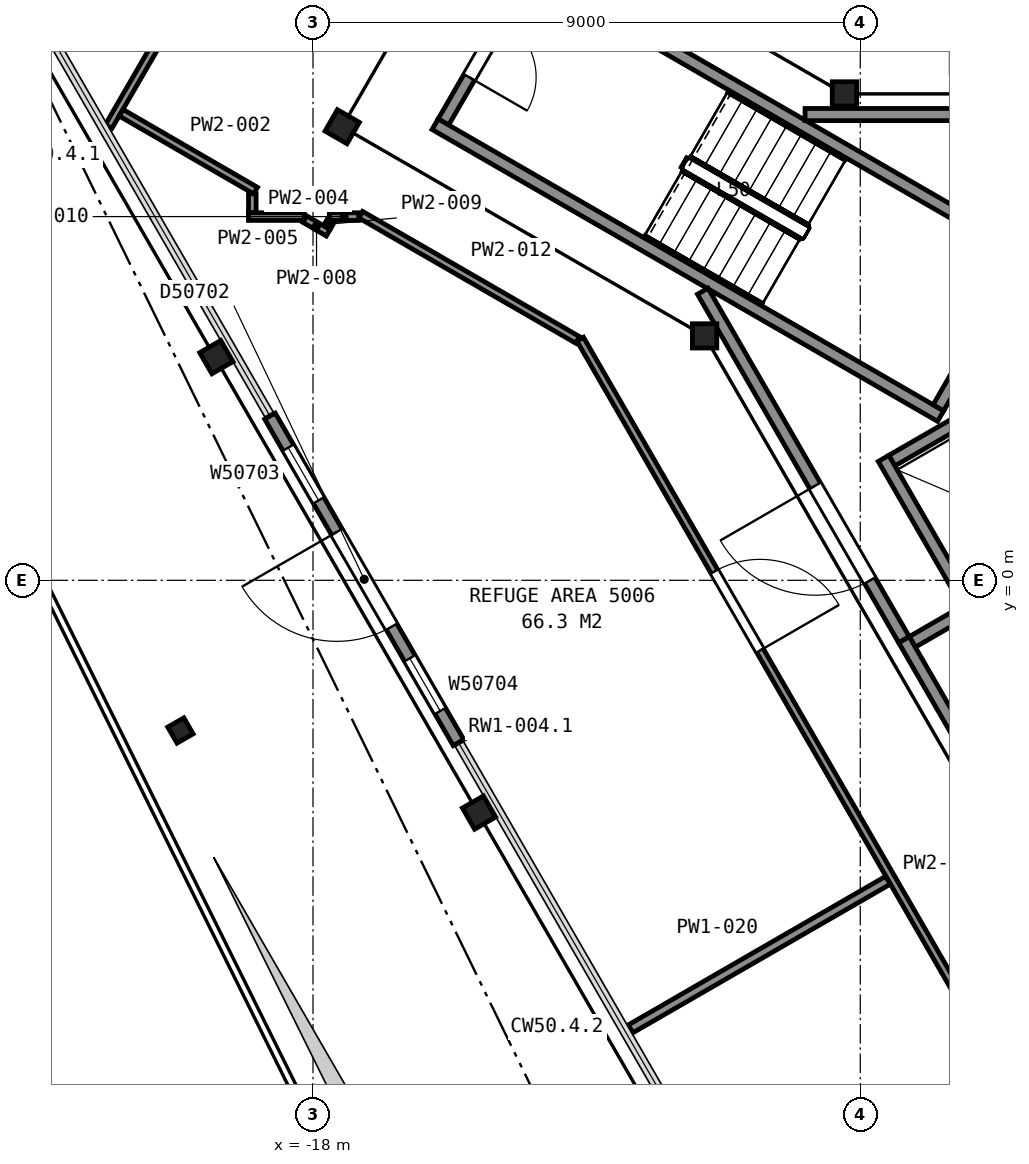
"""IFC4 building model, lengths in metres.
Left out: names, types, materials, properties, quantities, classifications, styles, units other than length and angle.
Written with IfcOpenShell. Run it as: python <this file> out.ifc"""

import sys

from ifc_helpers import new_model, si_unit, direction, frame, frame_2d, origin, origin_2d, place, context, subcontext, project, spatial, rectangle, hollow_rectangle, i_section, extrude, element, fill, save


model = new_model("IFC4")
c1 = context("Model", 3, precision=1e-05, world=origin(), true_north=direction((0.0, 1.0)))
c2 = subcontext(c1, "Body", "Model", "MODEL_VIEW")
j1 = project(units=[si_unit("LENGTHUNIT", "METRE"), si_unit("PLANEANGLEUNIT", "RADIAN")], contexts=[c1])
p1 = place(None, origin())
s1 = spatial("IfcSite", under=j1, at=p1, CompositionType="ELEMENT")
p2 = place(p1, origin())
s2 = spatial("IfcBuilding", under=s1, at=p2, CompositionType="ELEMENT")
p3 = place(p2, frame((0.0, 0.0, 200.6)))
s3 = spatial("IfcBuildingStorey", under=s2, at=p3, CompositionType="ELEMENT", Elevation=200.6)
for number, where, z_axis, x_axis in (
    (1, (-19.59, 3.67, -0.16), (0.0, 0.0, 1.0), (-0.5, 0.866, 0.0)),
    (2, (-15.27, -3.82, -0.16), (0.0, 0.0, 1.0), (-0.5, 0.866, 0.0)),
):
    element("IfcColumn", number, at=place(p3, frame(where, z_axis=z_axis, x_axis=x_axis)), inside=s3, PredefinedType="COLUMN", context=c2, shape_type="SweptSolid", body=[
        extrude(i_section(OverallWidth=0.401, OverallDepth=0.399, WebThickness=0.025, FlangeThickness=0.04, FilletRadius=0.015, at=origin_2d()), origin(), (0.0, 0.0, 1.0), 5.96),
    ])
p4 = place(p3, frame((-9.26, 8.0, 0.0), z_axis=(0.0, 0.0, 1.0), x_axis=(1.0, 0.0, 0.0)))
e3 = element("IfcColumn", 3, at=p4, inside=s3, PredefinedType="COLUMN", context=c2, shape_type="SweptSolid", body=[
    extrude(i_section(OverallWidth=0.401, OverallDepth=0.399, WebThickness=0.025, FlangeThickness=0.04, FilletRadius=0.015, at=origin_2d()), origin(), (0.0, 0.0, 1.0), 5.8),
])
p5 = place(p3, frame((-17.52, 7.46, 0.0), z_axis=(0.0, 0.0, 1.0), x_axis=(0.5, 0.866025403784, 0.0)))
e4 = element("IfcColumn", 4, at=p5, inside=s3, PredefinedType="COLUMN", context=c2, shape_type="SweptSolid", body=[
    extrude(i_section(OverallWidth=0.406, OverallDepth=0.417, WebThickness=0.03, FlangeThickness=0.048, FilletRadius=0.015, at=origin_2d()), origin(), (0.0, 0.0, 1.0), 5.8),
])
p6 = place(p3, frame((-11.56, 4.02, 0.0), z_axis=(0.0, 0.0, 1.0), x_axis=(1.0, 0.0, 0.0)))
e5 = element("IfcColumn", 5, at=p6, inside=s3, PredefinedType="COLUMN", context=c2, shape_type="SweptSolid", body=[
    extrude(i_section(OverallWidth=0.401, OverallDepth=0.399, WebThickness=0.025, FlangeThickness=0.04, FilletRadius=0.015, at=origin_2d()), origin(), (0.0, 0.0, 1.0), 5.8),
])
p7 = place(p3, frame((-20.18, -2.47, -0.69), z_axis=(0.0, 0.0, 1.0), x_axis=(-0.5, 0.866025403784, 0.0)))
e6 = element("IfcColumn", 6, at=p7, inside=s3, PredefinedType="COLUMN", context=c2, shape_type="SweptSolid", body=[
    extrude(hollow_rectangle(XDim=0.305, YDim=0.305, WallThickness=0.013, InnerFilletRadius=0.006, OuterFilletRadius=0.019, at=origin_2d()), origin(), (0.0, 0.0, 1.0), 5.4),
])
p8 = place(p3, frame((-18.708, 2.701, 0.0), z_axis=(0.0, 0.0, 1.0), x_axis=(0.500009909098, -0.866019682689, 0.0)))
e7 = element("IfcWall", 7, at=p8, inside=s3, PredefinedType="SOLIDWALL", context=c2, shape_type="SweptSolid", body=[
    extrude(rectangle(XDim=6.2, YDim=0.2, at=frame_2d((3.1, 0.0))), origin(), (0.0, 0.0, 1.0), 4.522),
])
p9 = place(p8, frame((0.6, 0.0, 0.9)))
e8 = element("IfcOpeningElement", 8, at=p9, cuts=e7, PredefinedType="OPENING", context=c2, shape_type="SweptSolid", body=[
    extrude(rectangle(XDim=1.0, YDim=1.5, at=frame_2d((0.5, 0.75))), frame((0.0, 0.11, 0.0), z_axis=(0.0, -1.0, 0.0), x_axis=(1.0, 0.0, 0.0)), (0.0, 0.0, 1.0), 0.22),
])
p10 = place(p8, frame((2.2, 0.0, 0.0)))
e9 = element("IfcOpeningElement", 9, at=p10, cuts=e7, PredefinedType="OPENING", context=c2, shape_type="SweptSolid", body=[
    extrude(rectangle(XDim=1.8, YDim=2.4, at=frame_2d((0.9, 1.2))), frame((0.0, 0.11, 0.0), z_axis=(0.0, -1.0, 0.0), x_axis=(1.0, 0.0, 0.0)), (0.0, 0.0, 1.0), 0.22),
])
p11 = place(p8, frame((4.6, 0.0, 0.9)))
e10 = element("IfcOpeningElement", 10, at=p11, cuts=e7, PredefinedType="OPENING", context=c2, shape_type="SweptSolid", body=[
    extrude(rectangle(XDim=1.0, YDim=1.5, at=frame_2d((0.5, 0.75))), frame((0.0, 0.11, 0.0), z_axis=(0.0, -1.0, 0.0), x_axis=(1.0, 0.0, 0.0)), (0.0, 0.0, 1.0), 0.22),
])
p12 = place(p3, frame((-14.455, 9.962, 0.0), z_axis=(0.0, 0.0, 1.0), x_axis=(-0.500049511043, -0.865996816683, 0.0)))
e11 = element("IfcWall", 11, at=p12, inside=s3, PredefinedType="PARTITIONING", context=c2, shape_type="SweptSolid", body=[
    extrude(rectangle(XDim=2.8, YDim=0.2, at=frame_2d((1.4, 0.0))), origin(), (0.0, 0.0, 1.0), 5.55),
])
p13 = place(p12, frame((0.85, 0.0, 0.0)))
e12 = element("IfcOpeningElement", 12, at=p13, cuts=e11, PredefinedType="OPENING", context=c2, shape_type="SweptSolid", body=[
    extrude(rectangle(XDim=1.1, YDim=2.1, at=frame_2d((0.55, 1.05))), frame((0.0, 0.11, 0.0), z_axis=(0.0, -1.0, 0.0), x_axis=(1.0, 0.0, 0.0)), (0.0, 0.0, 1.0), 0.22),
])
for number, where, z_axis, x_axis in (
    (13, (-7.678, 2.701, 0.0), (0.0, 0.0, 1.0), (-0.866, 0.5, 0.0)),
    (14, (-6.178, 5.299, 0.0), (0.0, 0.0, 1.0), (-0.866, 0.5, 0.0)),
):
    element("IfcWall", number, at=place(p3, frame(where, z_axis=z_axis, x_axis=x_axis)), inside=s3, PredefinedType="PARTITIONING", context=c2, shape_type="SweptSolid", body=[
        extrude(rectangle(XDim=9.6, YDim=0.2, at=frame_2d((4.8, 0.0))), origin(), (0.0, 0.0, 1.0), 5.55),
    ])
p14 = place(p3, frame((-6.315, 5.262, 0.0), z_axis=(0.0, 0.0, 1.0), x_axis=(-0.500049511043, -0.865996816683, 0.0)))
e15 = element("IfcWall", 15, at=p14, inside=s3, PredefinedType="PARTITIONING", context=c2, shape_type="SweptSolid", body=[
    extrude(rectangle(XDim=2.8, YDim=0.2, at=frame_2d((1.4, 0.0))), origin(), (0.0, 0.0, 1.0), 5.55),
])
p15 = place(p3, frame((-8.145, -1.013, 0.0), z_axis=(0.0, 0.0, 1.0), x_axis=(0.866016494683, 0.500015430699, 0.0)))
e16 = element("IfcWall", 16, at=p15, inside=s3, PredefinedType="PARTITIONING", context=c2, shape_type="SweptSolid", body=[
    extrude(rectangle(XDim=3.15, YDim=0.2, at=frame_2d((1.575, 0.0))), origin(), (0.0, 0.0, 1.0), 5.8),
])
p16 = place(p3, frame((-8.48, 1.969, 0.0), z_axis=(0.0, 0.0, 1.0), x_axis=(0.866000020948, 0.500043961785, 0.0)))
e17 = element("IfcWall", 17, at=p16, inside=s3, PredefinedType="PARTITIONING", context=c2, shape_type="SweptSolid", body=[
    extrude(rectangle(XDim=1.95, YDim=0.2, at=frame_2d((0.975, 0.0))), origin(), (0.0, 0.0, 1.0), 5.8),
])
p17 = place(p3, frame((-7.242, -0.376, 0.0), z_axis=(0.0, 0.0, 1.0), x_axis=(-0.499996545922, 0.866027397988, 0.0)))
e18 = element("IfcWall", 18, at=p17, inside=s3, PredefinedType="PARTITIONING", context=c2, shape_type="SweptSolid", body=[
    extrude(rectangle(XDim=2.75, YDim=0.2, at=frame_2d((1.375, 0.0))), origin(), (0.0, 0.0, 1.0), 5.8),
])
p18 = place(p3, frame((-7.006, -3.185, 0.0), z_axis=(0.0, 0.0, 1.0), x_axis=(-0.499990435942, 0.866030925526, 0.0)))
e19 = element("IfcWall", 19, at=p18, inside=s3, PredefinedType="PARTITIONING", context=c2, shape_type="SweptSolid", body=[
    extrude(rectangle(XDim=2.55, YDim=0.2, at=frame_2d((1.275, 0.0))), origin(), (0.0, 0.0, 1.0), 5.8),
])
p19 = place(p3, frame((-11.591, 4.755, 0.0), z_axis=(0.0, 0.0, 1.0), x_axis=(0.500043977787, -0.866000011708, 0.0)))
e20 = element("IfcWall", 20, at=p19, inside=s3, PredefinedType="PARTITIONING", context=c2, shape_type="SweptSolid", body=[
    extrude(rectangle(XDim=6.617, YDim=0.2, at=frame_2d((3.308, 0.0))), origin(), (0.0, 0.0, 1.0), 5.55),
])
p20 = place(p19, frame((3.695, 0.0, 0.0)))
e21 = element("IfcOpeningElement", 21, at=p20, cuts=e20, PredefinedType="OPENING", context=c2, shape_type="SweptSolid", body=[
    extrude(rectangle(XDim=1.8, YDim=2.1, at=frame_2d((0.9, 1.05))), frame((0.0, 0.11, 0.0), z_axis=(0.0, -1.0, 0.0), x_axis=(1.0, 0.0, 0.0)), (0.0, 0.0, 1.0), 0.22),
])
p21 = place(p3, frame((-9.908, 7.66, 0.0), z_axis=(0.0, 0.0, 1.0), x_axis=(1.0, 0.0, 0.0)))
e22 = element("IfcWall", 22, at=p21, inside=s3, PredefinedType="PARTITIONING", context=c2, shape_type="SweptSolid", body=[
    extrude(rectangle(XDim=3.621, YDim=0.2, at=frame_2d((1.811, 0.0))), origin(), (0.0, 0.0, 1.0), 5.55),
])
p22 = place(p3, frame((-21.36, 7.465, 0.0), z_axis=(0.0, 0.0, 1.0), x_axis=(0.501337933971, 0.86525156802, 0.0)))
e23 = element("IfcWall", 23, at=p22, inside=s3, PredefinedType="PARTITIONING", context=c2, shape_type="SweptSolid", body=[
    extrude(rectangle(XDim=3.604, YDim=0.125, at=frame_2d((1.802, 0.0))), origin(), (0.0, 0.0, 1.0), 4.462),
])
p23 = place(p3, frame((-21.155, 7.689, 0.0), z_axis=(0.0, 0.0, 1.0), x_axis=(0.865299783161, -0.501254710961, 0.0)))
e24 = element("IfcWall", 24, at=p23, inside=s3, PredefinedType="PARTITIONING", context=c2, shape_type="SweptSolid", body=[
    extrude(rectangle(XDim=2.555, YDim=0.125, at=frame_2d((1.278, 0.0))), origin(), (0.0, 0.0, 1.0), 4.462),
])
p24 = place(p3, frame((-18.998, 6.047, 0.0), z_axis=(0.0, 0.0, 1.0), x_axis=(0.0, 1.0, 0.0)))
e25 = element("IfcWall", 25, at=p24, inside=s3, PredefinedType="PARTITIONING", context=c2, shape_type="SweptSolid", body=[
    extrude(rectangle(XDim=0.308, YDim=0.125, at=frame_2d((0.154, 0.0))), origin(), (0.0, 0.0, 1.0), 4.462),
])
p25 = place(p3, frame((-19.061, 5.982, 0.0), z_axis=(0.0, 0.0, 1.0), x_axis=(1.0, 0.0, 0.0)))
e26 = element("IfcWall", 26, at=p25, inside=s3, PredefinedType="PARTITIONING", context=c2, shape_type="SweptSolid", body=[
    extrude(rectangle(XDim=0.915, YDim=0.125, at=frame_2d((0.458, 0.0))), origin(), (0.0, 0.0, 1.0), 4.462),
])
p26 = place(p3, frame((-18.135, 5.939, 0.0), z_axis=(0.0, 0.0, 1.0), x_axis=(0.865150363836, -0.501512560116, 0.0)))
e27 = element("IfcWall", 27, at=p26, inside=s3, PredefinedType="PARTITIONING", context=c2, shape_type="SweptSolid", body=[
    extrude(rectangle(XDim=0.444, YDim=0.125, at=frame_2d((0.222, 0.0))), origin(), (0.0, 0.0, 1.0), 4.462),
])
p27 = place(p3, frame((-17.771, 5.804, 0.0), z_axis=(0.0, 0.0, 1.0), x_axis=(0.499195341736, 0.86648947529, 0.0)))
e28 = element("IfcWall", 28, at=p27, inside=s3, PredefinedType="PARTITIONING", context=c2, shape_type="SweptSolid", body=[
    extrude(rectangle(XDim=0.12, YDim=0.125, at=frame_2d((0.06, 0.0))), origin(), (0.0, 0.0, 1.0), 4.462),
])
p28 = place(p3, frame((-17.731, 5.982, 0.0), z_axis=(0.0, 0.0, 1.0), x_axis=(1.0, 0.0, 0.0)))
e29 = element("IfcWall", 29, at=p28, inside=s3, PredefinedType="PARTITIONING", context=c2, shape_type="SweptSolid", body=[
    extrude(rectangle(XDim=0.485, YDim=0.125, at=frame_2d((0.243, 0.0))), origin(), (0.0, 0.0, 1.0), 4.462),
])
p29 = place(p3, frame((-17.215, 6.013, 0.0), z_axis=(0.0, 0.0, 1.0), x_axis=(0.866031617834, -0.499989236795, 0.0)))
e30 = element("IfcWall", 30, at=p29, inside=s3, PredefinedType="PARTITIONING", context=c2, shape_type="SweptSolid", body=[
    extrude(rectangle(XDim=4.119, YDim=0.125, at=frame_2d((2.06, 0.0))), origin(), (0.0, 0.0, 1.0), 4.462),
])
p30 = place(p3, frame((-3.901, -12.844, 0.0), z_axis=(0.0, 0.0, 1.0), x_axis=(-0.499989213553, 0.866031631253, 0.0)))
e31 = element("IfcWall", 31, at=p30, inside=s3, PredefinedType="PARTITIONING", context=c2, shape_type="SweptSolid", body=[
    extrude(rectangle(XDim=19.41, YDim=0.125, at=frame_2d((9.705, 0.0))), origin(), (0.0, 0.0, 1.0), 4.462),
])
p31 = place(p30, frame((13.497, 0.0, 0.0)))
e32 = element("IfcOpeningElement", 32, at=p31, cuts=e31, PredefinedType="OPENING", context=c2, shape_type="SweptSolid", body=[
    extrude(rectangle(XDim=1.5, YDim=2.1, at=frame_2d((0.75, 1.05))), frame((0.0, 0.073, 0.0), z_axis=(0.0, -1.0, 0.0), x_axis=(1.0, 0.0, 0.0)), (0.0, 0.0, 1.0), 0.145),
])
p32 = place(p30, frame((3.873, 0.0, 0.0)))
e33 = element("IfcOpeningElement", 33, at=p32, cuts=e31, PredefinedType="OPENING", context=c2, shape_type="SweptSolid", body=[
    extrude(rectangle(XDim=1.5, YDim=2.1, at=frame_2d((0.75, 1.05))), frame((0.0, 0.073, 0.0), z_axis=(0.0, -1.0, 0.0), x_axis=(1.0, 0.0, 0.0)), (0.0, 0.0, 1.0), 0.145),
])
p33 = place(p3, frame((-12.778, -7.378, 0.0), z_axis=(0.0, 0.0, 1.0), x_axis=(0.866027544323, 0.49999629246, 0.0)))
e34 = element("IfcWall", 34, at=p33, inside=s3, PredefinedType="PARTITIONING", context=c2, shape_type="SweptSolid", body=[
    extrude(rectangle(XDim=4.888, YDim=0.15, at=frame_2d((2.444, 0.0))), origin(), (0.0, 0.0, 1.0), 4.462),
])
p34 = place(p9, origin())
e35 = element("IfcWindow", 35, at=p34, inside=s3, PartitioningType="SINGLE_PANEL", PredefinedType="WINDOW", context=c2, shape_type="SweptSolid", body=[
    extrude(rectangle(XDim=1.0, YDim=1.5, at=frame_2d((0.5, 0.75))), frame((0.0, 0.03, 0.0), z_axis=(0.0, -1.0, 0.0), x_axis=(1.0, 0.0, 0.0)), (0.0, 0.0, 1.0), 0.06),
])
fill(e8, e35)
p35 = place(p10, frame((1.8, 0.0, 0.0), z_axis=(0.0, 0.0, 1.0), x_axis=(-1.0, 0.0, 0.0)))
e36 = element("IfcDoor", 36, at=p35, inside=s3, OperationType="DOUBLE_DOOR_SINGLE_SWING", PredefinedType="DOOR", context=c2, shape_type="SweptSolid", body=[
    extrude(rectangle(XDim=1.8, YDim=2.4, at=frame_2d((0.9, 1.2))), frame((0.0, 0.025, 0.0), z_axis=(0.0, -1.0, 0.0), x_axis=(1.0, 0.0, 0.0)), (0.0, 0.0, 1.0), 0.05),
])
fill(e9, e36)
p36 = place(p11, origin())
e37 = element("IfcWindow", 37, at=p36, inside=s3, PartitioningType="SINGLE_PANEL", PredefinedType="WINDOW", context=c2, shape_type="SweptSolid", body=[
    extrude(rectangle(XDim=1.0, YDim=1.5, at=frame_2d((0.5, 0.75))), frame((0.0, 0.03, 0.0), z_axis=(0.0, -1.0, 0.0), x_axis=(1.0, 0.0, 0.0)), (0.0, 0.0, 1.0), 0.06),
])
fill(e10, e37)
p37 = place(p13, origin())
e38 = element("IfcDoor", 38, at=p37, inside=s3, OperationType="SINGLE_SWING_RIGHT", PredefinedType="DOOR", context=c2, shape_type="SweptSolid", body=[
    extrude(rectangle(XDim=1.1, YDim=2.1, at=frame_2d((0.55, 1.05))), frame((0.0, 0.025, 0.0), z_axis=(0.0, -1.0, 0.0), x_axis=(1.0, 0.0, 0.0)), (0.0, 0.0, 1.0), 0.05),
])
fill(e12, e38)
p38 = place(p20, origin())
e39 = element("IfcDoor", 39, at=p38, inside=s3, OperationType="DOUBLE_DOOR_SINGLE_SWING", PredefinedType="DOOR", context=c2, shape_type="SweptSolid", body=[
    extrude(rectangle(XDim=1.8, YDim=2.1, at=frame_2d((0.9, 1.05))), frame((0.0, 0.025, 0.0), z_axis=(0.0, -1.0, 0.0), x_axis=(1.0, 0.0, 0.0)), (0.0, 0.0, 1.0), 0.05),
])
fill(e21, e39)
p39 = place(p31, origin())
e40 = element("IfcDoor", 40, at=p39, inside=s3, OperationType="DOUBLE_DOOR_SINGLE_SWING", PredefinedType="DOOR", context=c2, shape_type="SweptSolid", body=[
    extrude(rectangle(XDim=1.5, YDim=2.1, at=frame_2d((0.75, 1.05))), frame((0.0, 0.025, 0.0), z_axis=(0.0, -1.0, 0.0), x_axis=(1.0, 0.0, 0.0)), (0.0, 0.0, 1.0), 0.05),
])
fill(e32, e40)
save(model, sys.argv[1])
